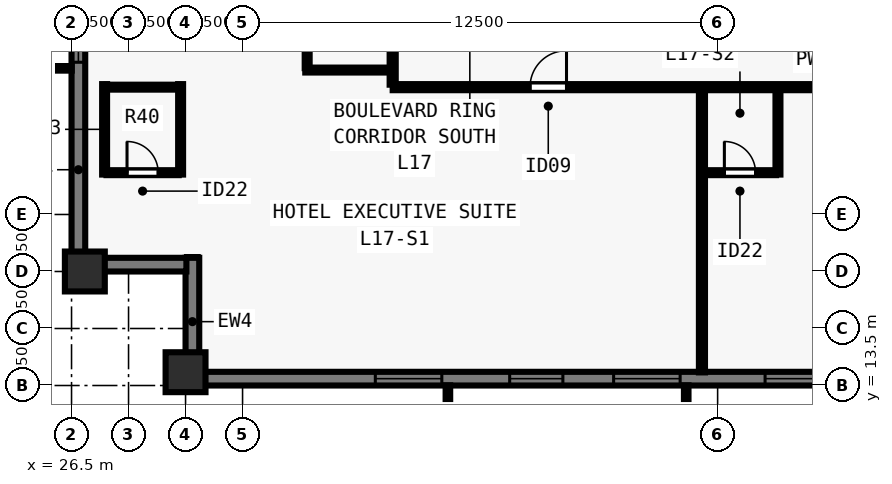
"""IFC4 building model, lengths in metres.
Left out: names, types, materials, properties, quantities, classifications, styles, units other than length and angle.
Written with IfcOpenShell. Run it as: python <this file> out.ifc"""

import sys

from ifc_helpers import new_model, si_unit, direction, frame, frame_2d, origin, origin_2d, place, context, subcontext, project, spatial, rectangle, extrude, element, fill, save


model = new_model("IFC4")
c1 = context("Model", 3, precision=1e-05, world=origin(), true_north=direction((0.0, 1.0)))
c2 = subcontext(c1, "Body", "Model", "MODEL_VIEW")
j1 = project(units=[si_unit("LENGTHUNIT", "METRE"), si_unit("PLANEANGLEUNIT", "RADIAN")], contexts=[c1])
p1 = place(None, origin())
s1 = spatial("IfcSite", under=j1, at=p1, CompositionType="ELEMENT")
p2 = place(p1, origin())
s2 = spatial("IfcBuilding", under=s1, at=p2, CompositionType="ELEMENT")
p3 = place(p2, frame((0.0, 0.0, 65.5)))
s3 = spatial("IfcBuildingStorey", under=s2, at=p3, CompositionType="ELEMENT", Elevation=65.5)
for number, where, z_axis, x_axis in (
    (1, (29.5, 13.85, 0.0), (0.0, 0.0, 1.0), (1.0, 0.0, 0.0)),
    (2, (26.85, 16.5, 0.0), (0.0, 0.0, 1.0), (0.0, 1.0, 0.0)),
):
    element("IfcColumn", number, at=place(p3, frame(where, z_axis=z_axis, x_axis=x_axis)), inside=s3, PredefinedType="COLUMN", context=c2, shape_type="SweptSolid", body=[
        extrude(rectangle(XDim=1.05, YDim=1.05, at=origin_2d()), origin(), (0.0, 0.0, 1.0), 3.5),
    ])
p4 = place(p3, frame((74.5, 13.68, 0.0), z_axis=(0.0, 0.0, 1.0), x_axis=(-1.0, 0.0, 0.0)))
e3 = element("IfcWall", 3, at=p4, inside=s3, PredefinedType="SOLIDWALL", context=c2, shape_type="SweptSolid", body=[
    extrude(rectangle(XDim=44.662, YDim=0.36, at=frame_2d((22.331, 0.0))), origin(), (0.0, 0.0, 1.0), 3.28),
])
p5 = place(p4, frame((4.655, 0.0, 0.8)))
e4 = element("IfcOpeningElement", 4, at=p5, cuts=e3, PredefinedType="OPENING", context=c2, shape_type="SweptSolid", body=[
    extrude(rectangle(XDim=1.75, YDim=1.544, at=frame_2d((0.875, 0.772))), frame((0.0, 0.19, 0.0), z_axis=(0.0, -1.0, 0.0), x_axis=(1.0, 0.0, 0.0)), (0.0, 0.0, 1.0), 0.38),
])
p6 = place(p4, frame((8.19, 0.0, 0.8)))
e5 = element("IfcOpeningElement", 5, at=p6, cuts=e3, PredefinedType="OPENING", context=c2, shape_type="SweptSolid", body=[
    extrude(rectangle(XDim=1.4, YDim=1.544, at=frame_2d((0.7, 0.772))), frame((0.0, 0.19, 0.0), z_axis=(0.0, -1.0, 0.0), x_axis=(1.0, 0.0, 0.0)), (0.0, 0.0, 1.0), 0.38),
])
p7 = place(p4, frame((11.375, 0.0, 0.8)))
e6 = element("IfcOpeningElement", 6, at=p7, cuts=e3, PredefinedType="OPENING", context=c2, shape_type="SweptSolid", body=[
    extrude(rectangle(XDim=1.75, YDim=1.544, at=frame_2d((0.875, 0.772))), frame((0.0, 0.19, 0.0), z_axis=(0.0, -1.0, 0.0), x_axis=(1.0, 0.0, 0.0)), (0.0, 0.0, 1.0), 0.38),
])
p8 = place(p4, frame((14.911, 0.0, 0.8)))
e7 = element("IfcOpeningElement", 7, at=p8, cuts=e3, PredefinedType="OPENING", context=c2, shape_type="SweptSolid", body=[
    extrude(rectangle(XDim=1.4, YDim=1.544, at=frame_2d((0.7, 0.772))), frame((0.0, 0.19, 0.0), z_axis=(0.0, -1.0, 0.0), x_axis=(1.0, 0.0, 0.0)), (0.0, 0.0, 1.0), 0.38),
])
p9 = place(p4, frame((18.546, 0.0, 0.8)))
e8 = element("IfcOpeningElement", 8, at=p9, cuts=e3, PredefinedType="OPENING", context=c2, shape_type="SweptSolid", body=[
    extrude(rectangle(XDim=1.75, YDim=1.544, at=frame_2d((0.875, 0.772))), frame((0.0, 0.19, 0.0), z_axis=(0.0, -1.0, 0.0), x_axis=(1.0, 0.0, 0.0)), (0.0, 0.0, 1.0), 0.38),
])
p10 = place(p4, frame((21.631, 0.0, 0.8)))
e9 = element("IfcOpeningElement", 9, at=p10, cuts=e3, PredefinedType="OPENING", context=c2, shape_type="SweptSolid", body=[
    extrude(rectangle(XDim=1.4, YDim=1.544, at=frame_2d((0.7, 0.772))), frame((0.0, 0.19, 0.0), z_axis=(0.0, -1.0, 0.0), x_axis=(1.0, 0.0, 0.0)), (0.0, 0.0, 1.0), 0.38),
])
p11 = place(p4, frame((24.366, 0.0, 0.8)))
e10 = element("IfcOpeningElement", 10, at=p11, cuts=e3, PredefinedType="OPENING", context=c2, shape_type="SweptSolid", body=[
    extrude(rectangle(XDim=1.75, YDim=1.544, at=frame_2d((0.875, 0.772))), frame((0.0, 0.19, 0.0), z_axis=(0.0, -1.0, 0.0), x_axis=(1.0, 0.0, 0.0)), (0.0, 0.0, 1.0), 0.38),
])
p12 = place(p4, frame((28.351, 0.0, 0.8)))
e11 = element("IfcOpeningElement", 11, at=p12, cuts=e3, PredefinedType="OPENING", context=c2, shape_type="SweptSolid", body=[
    extrude(rectangle(XDim=1.4, YDim=1.544, at=frame_2d((0.7, 0.772))), frame((0.0, 0.19, 0.0), z_axis=(0.0, -1.0, 0.0), x_axis=(1.0, 0.0, 0.0)), (0.0, 0.0, 1.0), 0.38),
])
p13 = place(p4, frame((31.987, 0.0, 0.8)))
e12 = element("IfcOpeningElement", 12, at=p13, cuts=e3, PredefinedType="OPENING", context=c2, shape_type="SweptSolid", body=[
    extrude(rectangle(XDim=1.75, YDim=1.544, at=frame_2d((0.875, 0.772))), frame((0.0, 0.19, 0.0), z_axis=(0.0, -1.0, 0.0), x_axis=(1.0, 0.0, 0.0)), (0.0, 0.0, 1.0), 0.38),
])
p14 = place(p4, frame((35.072, 0.0, 0.8)))
e13 = element("IfcOpeningElement", 13, at=p14, cuts=e3, PredefinedType="OPENING", context=c2, shape_type="SweptSolid", body=[
    extrude(rectangle(XDim=1.4, YDim=1.544, at=frame_2d((0.7, 0.772))), frame((0.0, 0.19, 0.0), z_axis=(0.0, -1.0, 0.0), x_axis=(1.0, 0.0, 0.0)), (0.0, 0.0, 1.0), 0.38),
])
p15 = place(p4, frame((38.257, 0.0, 0.8)))
e14 = element("IfcOpeningElement", 14, at=p15, cuts=e3, PredefinedType="OPENING", context=c2, shape_type="SweptSolid", body=[
    extrude(rectangle(XDim=1.75, YDim=1.544, at=frame_2d((0.875, 0.772))), frame((0.0, 0.19, 0.0), z_axis=(0.0, -1.0, 0.0), x_axis=(1.0, 0.0, 0.0)), (0.0, 0.0, 1.0), 0.38),
])
p16 = place(p3, frame((29.68, 13.5, 0.0), z_axis=(0.0, 0.0, 1.0), x_axis=(0.0, 1.0, 0.0)))
e15 = element("IfcWall", 15, at=p16, inside=s3, PredefinedType="SOLIDWALL", context=c2, shape_type="SweptSolid", body=[
    extrude(rectangle(XDim=3.36, YDim=0.36, at=frame_2d((1.68, 0.0))), origin(), (0.0, 0.0, 1.0), 3.28),
])
p17 = place(p3, frame((29.522, 16.68, 0.0), z_axis=(0.0, 0.0, 1.0), x_axis=(-1.0, 0.0, 0.0)))
e16 = element("IfcWall", 16, at=p17, inside=s3, PredefinedType="SOLIDWALL", context=c2, shape_type="SweptSolid", body=[
    extrude(rectangle(XDim=2.684, YDim=0.36, at=frame_2d((1.342, 0.0))), origin(), (0.0, 0.0, 1.0), 3.28),
])
p18 = place(p3, frame((26.68, 16.5, 0.0), z_axis=(0.0, 0.0, 1.0), x_axis=(0.0, 1.0, 0.0)))
e17 = element("IfcWall", 17, at=p18, inside=s3, PredefinedType="SOLIDWALL", context=c2, shape_type="SweptSolid", body=[
    extrude(rectangle(XDim=44.662, YDim=0.36, at=frame_2d((22.331, 0.0))), origin(), (0.0, 0.0, 1.0), 3.28),
])
p19 = place(p18, frame((5.505, 0.0, 0.8)))
e18 = element("IfcOpeningElement", 18, at=p19, cuts=e17, PredefinedType="OPENING", context=c2, shape_type="SweptSolid", body=[
    extrude(rectangle(XDim=1.75, YDim=1.544, at=frame_2d((0.875, 0.772))), frame((0.0, 0.19, 0.0), z_axis=(0.0, -1.0, 0.0), x_axis=(1.0, 0.0, 0.0)), (0.0, 0.0, 1.0), 0.38),
])
p20 = place(p18, frame((8.19, 0.0, 0.8)))
e19 = element("IfcOpeningElement", 19, at=p20, cuts=e17, PredefinedType="OPENING", context=c2, shape_type="SweptSolid", body=[
    extrude(rectangle(XDim=1.4, YDim=1.544, at=frame_2d((0.7, 0.772))), frame((0.0, 0.19, 0.0), z_axis=(0.0, -1.0, 0.0), x_axis=(1.0, 0.0, 0.0)), (0.0, 0.0, 1.0), 0.38),
])
p21 = place(p18, frame((11.375, 0.0, 0.8)))
e20 = element("IfcOpeningElement", 20, at=p21, cuts=e17, PredefinedType="OPENING", context=c2, shape_type="SweptSolid", body=[
    extrude(rectangle(XDim=1.75, YDim=1.544, at=frame_2d((0.875, 0.772))), frame((0.0, 0.19, 0.0), z_axis=(0.0, -1.0, 0.0), x_axis=(1.0, 0.0, 0.0)), (0.0, 0.0, 1.0), 0.38),
])
p22 = place(p18, frame((14.911, 0.0, 0.8)))
e21 = element("IfcOpeningElement", 21, at=p22, cuts=e17, PredefinedType="OPENING", context=c2, shape_type="SweptSolid", body=[
    extrude(rectangle(XDim=1.4, YDim=1.544, at=frame_2d((0.7, 0.772))), frame((0.0, 0.19, 0.0), z_axis=(0.0, -1.0, 0.0), x_axis=(1.0, 0.0, 0.0)), (0.0, 0.0, 1.0), 0.38),
])
p23 = place(p18, frame((18.546, 0.0, 0.8)))
e22 = element("IfcOpeningElement", 22, at=p23, cuts=e17, PredefinedType="OPENING", context=c2, shape_type="SweptSolid", body=[
    extrude(rectangle(XDim=1.75, YDim=1.544, at=frame_2d((0.875, 0.772))), frame((0.0, 0.19, 0.0), z_axis=(0.0, -1.0, 0.0), x_axis=(1.0, 0.0, 0.0)), (0.0, 0.0, 1.0), 0.38),
])
p24 = place(p18, frame((22.481, 0.0, 0.8)))
e23 = element("IfcOpeningElement", 23, at=p24, cuts=e17, PredefinedType="OPENING", context=c2, shape_type="SweptSolid", body=[
    extrude(rectangle(XDim=1.4, YDim=1.544, at=frame_2d((0.7, 0.772))), frame((0.0, 0.19, 0.0), z_axis=(0.0, -1.0, 0.0), x_axis=(1.0, 0.0, 0.0)), (0.0, 0.0, 1.0), 0.38),
])
p25 = place(p18, frame((24.366, 0.0, 0.8)))
e24 = element("IfcOpeningElement", 24, at=p25, cuts=e17, PredefinedType="OPENING", context=c2, shape_type="SweptSolid", body=[
    extrude(rectangle(XDim=1.75, YDim=1.544, at=frame_2d((0.875, 0.772))), frame((0.0, 0.19, 0.0), z_axis=(0.0, -1.0, 0.0), x_axis=(1.0, 0.0, 0.0)), (0.0, 0.0, 1.0), 0.38),
])
p26 = place(p18, frame((28.351, 0.0, 0.8)))
e25 = element("IfcOpeningElement", 25, at=p26, cuts=e17, PredefinedType="OPENING", context=c2, shape_type="SweptSolid", body=[
    extrude(rectangle(XDim=1.4, YDim=1.544, at=frame_2d((0.7, 0.772))), frame((0.0, 0.19, 0.0), z_axis=(0.0, -1.0, 0.0), x_axis=(1.0, 0.0, 0.0)), (0.0, 0.0, 1.0), 0.38),
])
p27 = place(p18, frame((31.537, 0.0, 0.8)))
e26 = element("IfcOpeningElement", 26, at=p27, cuts=e17, PredefinedType="OPENING", context=c2, shape_type="SweptSolid", body=[
    extrude(rectangle(XDim=1.75, YDim=1.544, at=frame_2d((0.875, 0.772))), frame((0.0, 0.19, 0.0), z_axis=(0.0, -1.0, 0.0), x_axis=(1.0, 0.0, 0.0)), (0.0, 0.0, 1.0), 0.38),
])
p28 = place(p18, frame((35.072, 0.0, 0.8)))
e27 = element("IfcOpeningElement", 27, at=p28, cuts=e17, PredefinedType="OPENING", context=c2, shape_type="SweptSolid", body=[
    extrude(rectangle(XDim=1.4, YDim=1.544, at=frame_2d((0.7, 0.772))), frame((0.0, 0.19, 0.0), z_axis=(0.0, -1.0, 0.0), x_axis=(1.0, 0.0, 0.0)), (0.0, 0.0, 1.0), 0.38),
])
p29 = place(p18, frame((37.807, 0.0, 0.8)))
e28 = element("IfcOpeningElement", 28, at=p29, cuts=e17, PredefinedType="OPENING", context=c2, shape_type="SweptSolid", body=[
    extrude(rectangle(XDim=1.75, YDim=1.544, at=frame_2d((0.875, 0.772))), frame((0.0, 0.19, 0.0), z_axis=(0.0, -1.0, 0.0), x_axis=(1.0, 0.0, 0.0)), (0.0, 0.0, 1.0), 0.38),
])
p30 = place(p3, frame((34.95, 21.35, 0.0), z_axis=(0.0, 0.0, 1.0), x_axis=(1.0, 0.0, 0.0)))
e29 = element("IfcWall", 29, at=p30, inside=s3, PredefinedType="PARTITIONING", context=c2, shape_type="SweptSolid", body=[
    extrude(rectangle(XDim=34.1, YDim=0.16, at=frame_2d((17.05, 0.0))), origin(), (0.0, 0.0, 1.0), 3.28),
])
p31 = place(p30, frame((3.614, 0.0, 0.0)))
e30 = element("IfcOpeningElement", 30, at=p31, cuts=e29, PredefinedType="OPENING", context=c2, shape_type="SweptSolid", body=[
    extrude(rectangle(XDim=0.96, YDim=2.15, at=frame_2d((0.48, 1.075))), frame((0.0, 0.09, 0.0), z_axis=(0.0, -1.0, 0.0), x_axis=(1.0, 0.0, 0.0)), (0.0, 0.0, 1.0), 0.18),
])
p32 = place(p30, frame((17.56, 0.0, 0.0)))
e31 = element("IfcOpeningElement", 31, at=p32, cuts=e29, PredefinedType="OPENING", context=c2, shape_type="SweptSolid", body=[
    extrude(rectangle(XDim=0.96, YDim=2.15, at=frame_2d((0.48, 1.075))), frame((0.0, 0.09, 0.0), z_axis=(0.0, -1.0, 0.0), x_axis=(1.0, 0.0, 0.0)), (0.0, 0.0, 1.0), 0.18),
])
p33 = place(p30, frame((30.516, 0.0, 0.0)))
e32 = element("IfcOpeningElement", 32, at=p33, cuts=e29, PredefinedType="OPENING", context=c2, shape_type="SweptSolid", body=[
    extrude(rectangle(XDim=0.96, YDim=2.15, at=frame_2d((0.48, 1.075))), frame((0.0, 0.09, 0.0), z_axis=(0.0, -1.0, 0.0), x_axis=(1.0, 0.0, 0.0)), (0.0, 0.0, 1.0), 0.18),
])
p34 = place(p3, frame((34.95, 21.415, 0.0), z_axis=(0.0, 0.0, 1.0), x_axis=(0.0, 1.0, 0.0)))
e33 = element("IfcWall", 33, at=p34, inside=s3, PredefinedType="PARTITIONING", context=c2, shape_type="SweptSolid", body=[
    extrude(rectangle(XDim=35.17, YDim=0.16, at=frame_2d((17.585, 0.0))), origin(), (0.0, 0.0, 1.0), 3.28),
])
p35 = place(p34, frame((9.414, 0.0, 0.0)))
e34 = element("IfcOpeningElement", 34, at=p35, cuts=e33, PredefinedType="OPENING", context=c2, shape_type="SweptSolid", body=[
    extrude(rectangle(XDim=0.96, YDim=2.15, at=frame_2d((0.48, 1.075))), frame((0.0, 0.09, 0.0), z_axis=(0.0, -1.0, 0.0), x_axis=(1.0, 0.0, 0.0)), (0.0, 0.0, 1.0), 0.18),
])
p36 = place(p34, frame((26.814, 0.0, 0.0)))
e35 = element("IfcOpeningElement", 35, at=p36, cuts=e33, PredefinedType="OPENING", context=c2, shape_type="SweptSolid", body=[
    extrude(rectangle(XDim=0.96, YDim=2.15, at=frame_2d((0.48, 1.075))), frame((0.0, 0.09, 0.0), z_axis=(0.0, -1.0, 0.0), x_axis=(1.0, 0.0, 0.0)), (0.0, 0.0, 1.0), 0.18),
])
for number, where, z_axis, x_axis in (
    (36, (27.37, 19.05, 0.0), (0.0, 0.0, 1.0), (0.0, 1.0, 0.0)),
    (37, (29.37, 19.05, 0.0), (0.0, 0.0, 1.0), (0.0, 1.0, 0.0)),
):
    element("IfcWall", number, at=place(p3, frame(where, z_axis=z_axis, x_axis=x_axis)), inside=s3, PredefinedType="PLUMBINGWALL", context=c2, shape_type="SweptSolid", body=[
        extrude(rectangle(XDim=2.38, YDim=0.13, at=frame_2d((1.19, 0.0))), origin(), (0.0, 0.0, 1.0), 3.28),
    ])
p37 = place(p3, frame((27.42, 19.1, 0.0), z_axis=(0.0, 0.0, 1.0), x_axis=(1.0, 0.0, 0.0)))
e38 = element("IfcWall", 38, at=p37, inside=s3, PredefinedType="PLUMBINGWALL", context=c2, shape_type="SweptSolid", body=[
    extrude(rectangle(XDim=1.9, YDim=0.13, at=frame_2d((0.95, 0.0))), origin(), (0.0, 0.0, 1.0), 3.28),
])
p38 = place(p37, frame((0.54, 0.0, 0.0)))
e39 = element("IfcOpeningElement", 39, at=p38, cuts=e38, PredefinedType="OPENING", context=c2, shape_type="SweptSolid", body=[
    extrude(rectangle(XDim=0.82, YDim=2.1, at=frame_2d((0.41, 1.05))), frame((0.0, 0.075, 0.0), z_axis=(0.0, -1.0, 0.0), x_axis=(1.0, 0.0, 0.0)), (0.0, 0.0, 1.0), 0.15),
])
p39 = place(p3, frame((27.42, 21.35, 0.0), z_axis=(0.0, 0.0, 1.0), x_axis=(1.0, 0.0, 0.0)))
e40 = element("IfcWall", 40, at=p39, inside=s3, PredefinedType="PLUMBINGWALL", context=c2, shape_type="SweptSolid", body=[
    extrude(rectangle(XDim=1.9, YDim=0.13, at=frame_2d((0.95, 0.0))), origin(), (0.0, 0.0, 1.0), 3.28),
])
p40 = place(p3, frame((43.087, 13.845, 0.0), z_axis=(0.0, 0.0, 1.0), x_axis=(0.0, 1.0, 0.0)))
e41 = element("IfcWall", 41, at=p40, inside=s3, PredefinedType="PARTITIONING", context=c2, shape_type="SweptSolid", body=[
    extrude(rectangle(XDim=7.44, YDim=0.16, at=frame_2d((3.72, 0.0))), origin(), (0.0, 0.0, 1.0), 3.28),
])
p41 = place(p3, frame((45.087, 19.05, 0.0), z_axis=(0.0, 0.0, 1.0), x_axis=(0.0, 1.0, 0.0)))
e42 = element("IfcWall", 42, at=p41, inside=s3, PredefinedType="PLUMBINGWALL", context=c2, shape_type="SweptSolid", body=[
    extrude(rectangle(XDim=2.235, YDim=0.13, at=frame_2d((1.117, 0.0))), origin(), (0.0, 0.0, 1.0), 3.28),
])
p42 = place(p3, frame((43.153, 19.1, 0.0), z_axis=(0.0, 0.0, 1.0), x_axis=(1.0, 0.0, 0.0)))
e43 = element("IfcWall", 43, at=p42, inside=s3, PredefinedType="PLUMBINGWALL", context=c2, shape_type="SweptSolid", body=[
    extrude(rectangle(XDim=1.885, YDim=0.13, at=frame_2d((0.942, 0.0))), origin(), (0.0, 0.0, 1.0), 3.28),
])
p43 = place(p42, frame((0.525, 0.0, 0.0)))
e44 = element("IfcOpeningElement", 44, at=p43, cuts=e43, PredefinedType="OPENING", context=c2, shape_type="SweptSolid", body=[
    extrude(rectangle(XDim=0.82, YDim=2.1, at=frame_2d((0.41, 1.05))), frame((0.0, 0.075, 0.0), z_axis=(0.0, -1.0, 0.0), x_axis=(1.0, 0.0, 0.0)), (0.0, 0.0, 1.0), 0.15),
])
p44 = place(p3, frame((32.65, 21.8, 0.0), z_axis=(0.0, 0.0, 1.0), x_axis=(1.0, 0.0, 0.0)))
e45 = element("IfcWall", 45, at=p44, inside=s3, PredefinedType="PLUMBINGWALL", context=c2, shape_type="SweptSolid", body=[
    extrude(rectangle(XDim=2.235, YDim=0.13, at=frame_2d((1.118, 0.0))), origin(), (0.0, 0.0, 1.0), 2.849),
])
p45 = place(p3, frame((32.7, 21.85, 0.0), z_axis=(0.0, 0.0, 1.0), x_axis=(0.0, 1.0, 0.0)))
e46 = element("IfcWall", 46, at=p45, inside=s3, PredefinedType="PLUMBINGWALL", context=c2, shape_type="SweptSolid", body=[
    extrude(rectangle(XDim=1.9, YDim=0.13, at=frame_2d((0.95, 0.0))), origin(), (0.0, 0.0, 1.0), 3.28),
])
p46 = place(p45, frame((0.54, 0.0, 0.0)))
e47 = element("IfcOpeningElement", 47, at=p46, cuts=e46, PredefinedType="OPENING", context=c2, shape_type="SweptSolid", body=[
    extrude(rectangle(XDim=0.82, YDim=2.1, at=frame_2d((0.41, 1.05))), frame((0.0, 0.075, 0.0), z_axis=(0.0, -1.0, 0.0), x_axis=(1.0, 0.0, 0.0)), (0.0, 0.0, 1.0), 0.15),
])
p47 = place(p12, origin())
e48 = element("IfcWindow", 48, at=p47, inside=s3, PartitioningType="SINGLE_PANEL", PredefinedType="WINDOW", context=c2, shape_type="SweptSolid", body=[
    extrude(rectangle(XDim=1.4, YDim=1.544, at=frame_2d((0.7, 0.772))), frame((0.0, -0.05, 0.0), z_axis=(0.0, -1.0, 0.0), x_axis=(1.0, 0.0, 0.0)), (0.0, 0.0, 1.0), 0.06),
])
fill(e11, e48)
p48 = place(p13, origin())
e49 = element("IfcWindow", 49, at=p48, inside=s3, PartitioningType="SINGLE_PANEL", PredefinedType="WINDOW", context=c2, shape_type="SweptSolid", body=[
    extrude(rectangle(XDim=1.75, YDim=1.544, at=frame_2d((0.875, 0.772))), frame((0.0, -0.05, 0.0), z_axis=(0.0, -1.0, 0.0), x_axis=(1.0, 0.0, 0.0)), (0.0, 0.0, 1.0), 0.06),
])
fill(e12, e49)
p49 = place(p14, origin())
e50 = element("IfcWindow", 50, at=p49, inside=s3, PartitioningType="SINGLE_PANEL", PredefinedType="WINDOW", context=c2, shape_type="SweptSolid", body=[
    extrude(rectangle(XDim=1.4, YDim=1.544, at=frame_2d((0.7, 0.772))), frame((0.0, -0.05, 0.0), z_axis=(0.0, -1.0, 0.0), x_axis=(1.0, 0.0, 0.0)), (0.0, 0.0, 1.0), 0.06),
])
fill(e13, e50)
p50 = place(p15, origin())
e51 = element("IfcWindow", 51, at=p50, inside=s3, PartitioningType="SINGLE_PANEL", PredefinedType="WINDOW", context=c2, shape_type="SweptSolid", body=[
    extrude(rectangle(XDim=1.75, YDim=1.544, at=frame_2d((0.875, 0.772))), frame((0.0, -0.05, 0.0), z_axis=(0.0, -1.0, 0.0), x_axis=(1.0, 0.0, 0.0)), (0.0, 0.0, 1.0), 0.06),
])
fill(e14, e51)
p51 = place(p19, origin())
e52 = element("IfcWindow", 52, at=p51, inside=s3, PartitioningType="SINGLE_PANEL", PredefinedType="WINDOW", context=c2, shape_type="SweptSolid", body=[
    extrude(rectangle(XDim=1.75, YDim=1.544, at=frame_2d((0.875, 0.772))), frame((0.0, -0.05, 0.0), z_axis=(0.0, -1.0, 0.0), x_axis=(1.0, 0.0, 0.0)), (0.0, 0.0, 1.0), 0.06),
])
fill(e18, e52)
p52 = place(p38, origin())
e53 = element("IfcDoor", 53, at=p52, inside=s3, OperationType="SINGLE_SWING_LEFT", PredefinedType="DOOR", context=c2, shape_type="SweptSolid", body=[
    extrude(rectangle(XDim=0.82, YDim=2.1, at=frame_2d((0.41, 1.05))), frame((0.0, 0.025, 0.0), z_axis=(0.0, -1.0, 0.0), x_axis=(1.0, 0.0, 0.0)), (0.0, 0.0, 1.0), 0.05),
])
fill(e39, e53)
p53 = place(p31, origin())
e54 = element("IfcDoor", 54, at=p53, inside=s3, OperationType="SINGLE_SWING_RIGHT", PredefinedType="DOOR", context=c2, shape_type="SweptSolid", body=[
    extrude(rectangle(XDim=0.96, YDim=2.15, at=frame_2d((0.48, 1.075))), frame((0.0, 0.025, 0.0), z_axis=(0.0, -1.0, 0.0), x_axis=(1.0, 0.0, 0.0)), (0.0, 0.0, 1.0), 0.05),
])
fill(e30, e54)
p54 = place(p43, origin())
e55 = element("IfcDoor", 55, at=p54, inside=s3, OperationType="SINGLE_SWING_LEFT", PredefinedType="DOOR", context=c2, shape_type="SweptSolid", body=[
    extrude(rectangle(XDim=0.82, YDim=2.1, at=frame_2d((0.41, 1.05))), frame((0.0, 0.025, 0.0), z_axis=(0.0, -1.0, 0.0), x_axis=(1.0, 0.0, 0.0)), (0.0, 0.0, 1.0), 0.05),
])
fill(e44, e55)
save(model, sys.argv[1])
